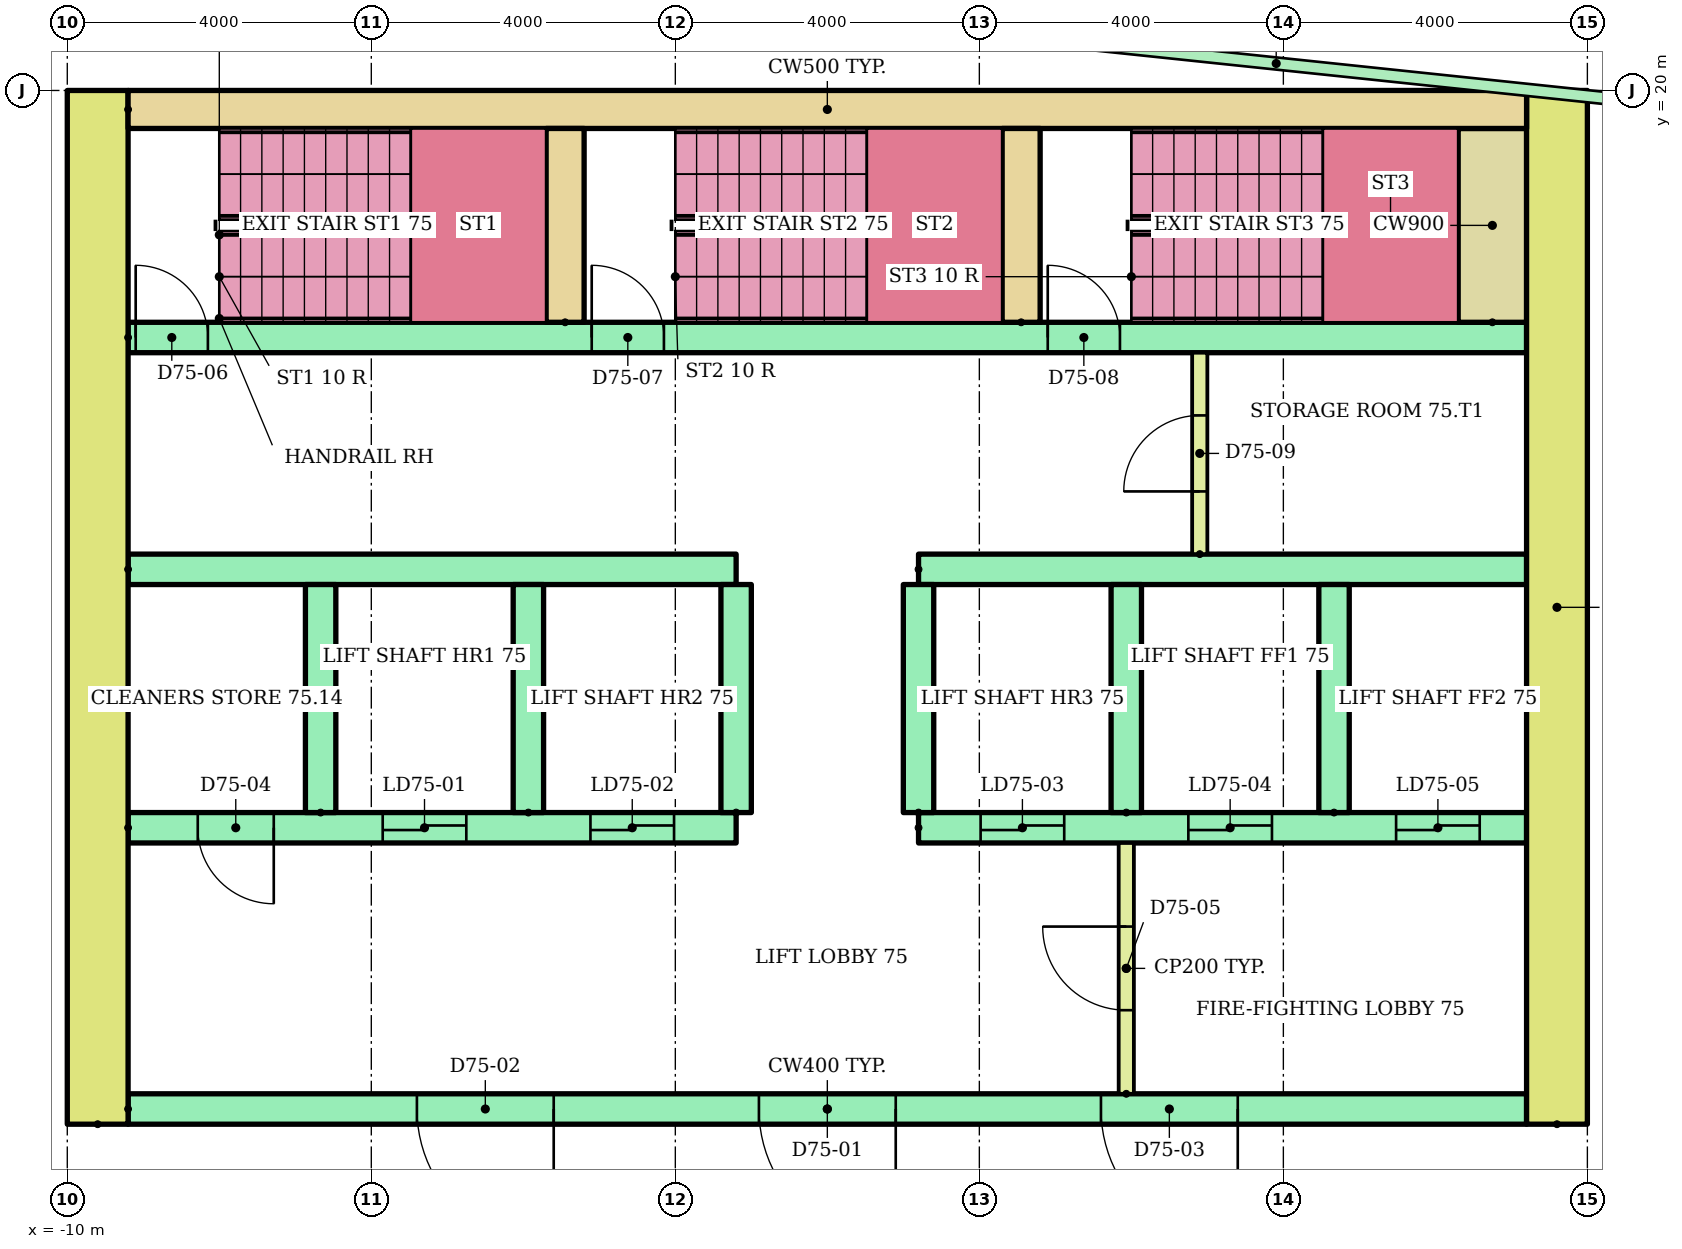
"""IFC4 building model, lengths in metres.
Left out: names, types, materials, properties, quantities, classifications, styles, units other than length and angle.
Written with IfcOpenShell. Run it as: python <this file> out.ifc"""

import sys

from ifc_helpers import new_model, si_unit, direction, frame, frame_2d, origin, place, context, subcontext, project, spatial, rectangle, extrude, element, fill, save


model = new_model("IFC4")
c1 = context("Model", 3, precision=1e-05, world=origin(), true_north=direction((0.0, 1.0)))
c2 = subcontext(c1, "Body", "Model", "MODEL_VIEW")
j1 = project(units=[si_unit("LENGTHUNIT", "METRE"), si_unit("PLANEANGLEUNIT", "RADIAN")], contexts=[c1])
p1 = place(None, origin())
s1 = spatial("IfcSite", under=j1, at=p1, CompositionType="ELEMENT")
p2 = place(p1, origin())
s2 = spatial("IfcBuilding", under=s1, at=p2, CompositionType="ELEMENT")
p3 = place(p2, frame((0.0, 0.0, 291.5)))
s3 = spatial("IfcBuildingStorey", under=s2, at=p3, CompositionType="ELEMENT", Elevation=291.5)
for number, where, z_axis, x_axis in (
    (1, (-9.6, 6.4, 0.0), (0.0, 0.0, 1.0), (0.0, 1.0, 0.0)),
    (2, (9.6, 6.4, 0.0), (0.0, 0.0, 1.0), (0.0, 1.0, 0.0)),
):
    element("IfcWall", number, at=place(p3, frame(where, z_axis=z_axis, x_axis=x_axis)), inside=s3, PredefinedType="SHEAR", context=c2, shape_type="SweptSolid", body=[
        extrude(rectangle(XDim=13.6, YDim=0.8, at=frame_2d((6.8, 0.0))), origin(), (0.0, 0.0, 1.0), 3.12),
    ])
p4 = place(p3, frame((-9.2, 19.75, 0.0)))
e3 = element("IfcWall", 3, at=p4, inside=s3, PredefinedType="SHEAR", context=c2, shape_type="SweptSolid", body=[
    extrude(rectangle(XDim=18.4, YDim=0.5, at=frame_2d((9.2, 0.0))), origin(), (0.0, 0.0, 1.0), 3.12),
])
p5 = place(p3, frame((-9.2, 6.6, 0.0)))
e4 = element("IfcWall", 4, at=p5, inside=s3, PredefinedType="SHEAR", context=c2, shape_type="SweptSolid", body=[
    extrude(rectangle(XDim=18.4, YDim=0.4, at=frame_2d((9.2, 0.0))), origin(), (0.0, 0.0, 1.0), 3.12),
])
p6 = place(p5, frame((8.3, 0.0, 0.0)))
e5 = element("IfcOpeningElement", 5, at=p6, cuts=e4, PredefinedType="OPENING", context=c2, shape_type="SweptSolid", body=[
    extrude(rectangle(XDim=1.8, YDim=2.1, at=frame_2d((0.9, 1.05))), frame((0.0, 0.21, 0.0), z_axis=(0.0, -1.0, 0.0), x_axis=(1.0, 0.0, 0.0)), (0.0, 0.0, 1.0), 0.42),
])
p7 = place(p5, frame((3.8, 0.0, 0.0)))
e6 = element("IfcOpeningElement", 6, at=p7, cuts=e4, PredefinedType="OPENING", context=c2, shape_type="SweptSolid", body=[
    extrude(rectangle(XDim=1.8, YDim=2.1, at=frame_2d((0.9, 1.05))), frame((0.0, 0.21, 0.0), z_axis=(0.0, -1.0, 0.0), x_axis=(1.0, 0.0, 0.0)), (0.0, 0.0, 1.0), 0.42),
])
p8 = place(p5, frame((12.8, 0.0, 0.0)))
e7 = element("IfcOpeningElement", 7, at=p8, cuts=e4, PredefinedType="OPENING", context=c2, shape_type="SweptSolid", body=[
    extrude(rectangle(XDim=1.8, YDim=2.1, at=frame_2d((0.9, 1.05))), frame((0.0, 0.21, 0.0), z_axis=(0.0, -1.0, 0.0), x_axis=(1.0, 0.0, 0.0)), (0.0, 0.0, 1.0), 0.42),
])
p9 = place(p3, frame((-9.2, 10.3, 0.0)))
e8 = element("IfcWall", 8, at=p9, inside=s3, PredefinedType="SHEAR", context=c2, shape_type="SweptSolid", body=[
    extrude(rectangle(XDim=8.0, YDim=0.4, at=frame_2d((4.0, 0.0))), origin(), (0.0, 0.0, 1.0), 3.12),
])
p10 = place(p9, frame((3.35, 0.0, 0.0)))
e9 = element("IfcOpeningElement", 9, at=p10, cuts=e8, PredefinedType="OPENING", context=c2, shape_type="SweptSolid", body=[
    extrude(rectangle(XDim=1.1, YDim=2.1, at=frame_2d((0.55, 1.05))), frame((0.0, 0.21, 0.0), z_axis=(0.0, -1.0, 0.0), x_axis=(1.0, 0.0, 0.0)), (0.0, 0.0, 1.0), 0.42),
])
p11 = place(p9, frame((6.083, 0.0, 0.0)))
e10 = element("IfcOpeningElement", 10, at=p11, cuts=e8, PredefinedType="OPENING", context=c2, shape_type="SweptSolid", body=[
    extrude(rectangle(XDim=1.1, YDim=2.1, at=frame_2d((0.55, 1.05))), frame((0.0, 0.21, 0.0), z_axis=(0.0, -1.0, 0.0), x_axis=(1.0, 0.0, 0.0)), (0.0, 0.0, 1.0), 0.42),
])
p12 = place(p9, frame((0.917, 0.0, 0.0)))
e11 = element("IfcOpeningElement", 11, at=p12, cuts=e8, PredefinedType="OPENING", context=c2, shape_type="SweptSolid", body=[
    extrude(rectangle(XDim=1.0, YDim=2.1, at=frame_2d((0.5, 1.05))), frame((0.0, 0.21, 0.0), z_axis=(0.0, -1.0, 0.0), x_axis=(1.0, 0.0, 0.0)), (0.0, 0.0, 1.0), 0.42),
])
p13 = place(p3, frame((-9.2, 13.7, 0.0)))
e12 = element("IfcWall", 12, at=p13, inside=s3, PredefinedType="SHEAR", context=c2, shape_type="SweptSolid", body=[
    extrude(rectangle(XDim=8.0, YDim=0.4, at=frame_2d((4.0, 0.0))), origin(), (0.0, 0.0, 1.0), 3.12),
])
p14 = place(p3, frame((1.2, 10.3, 0.0)))
e13 = element("IfcWall", 13, at=p14, inside=s3, PredefinedType="SHEAR", context=c2, shape_type="SweptSolid", body=[
    extrude(rectangle(XDim=8.0, YDim=0.4, at=frame_2d((4.0, 0.0))), origin(), (0.0, 0.0, 1.0), 3.12),
])
p15 = place(p14, frame((0.817, 0.0, 0.0)))
e14 = element("IfcOpeningElement", 14, at=p15, cuts=e13, PredefinedType="OPENING", context=c2, shape_type="SweptSolid", body=[
    extrude(rectangle(XDim=1.1, YDim=2.1, at=frame_2d((0.55, 1.05))), frame((0.0, 0.21, 0.0), z_axis=(0.0, -1.0, 0.0), x_axis=(1.0, 0.0, 0.0)), (0.0, 0.0, 1.0), 0.42),
])
p16 = place(p14, frame((3.55, 0.0, 0.0)))
e15 = element("IfcOpeningElement", 15, at=p16, cuts=e13, PredefinedType="OPENING", context=c2, shape_type="SweptSolid", body=[
    extrude(rectangle(XDim=1.1, YDim=2.1, at=frame_2d((0.55, 1.05))), frame((0.0, 0.21, 0.0), z_axis=(0.0, -1.0, 0.0), x_axis=(1.0, 0.0, 0.0)), (0.0, 0.0, 1.0), 0.42),
])
p17 = place(p14, frame((6.283, 0.0, 0.0)))
e16 = element("IfcOpeningElement", 16, at=p17, cuts=e13, PredefinedType="OPENING", context=c2, shape_type="SweptSolid", body=[
    extrude(rectangle(XDim=1.1, YDim=2.1, at=frame_2d((0.55, 1.05))), frame((0.0, 0.21, 0.0), z_axis=(0.0, -1.0, 0.0), x_axis=(1.0, 0.0, 0.0)), (0.0, 0.0, 1.0), 0.42),
])
p18 = place(p3, frame((1.2, 13.7, 0.0)))
e17 = element("IfcWall", 17, at=p18, inside=s3, PredefinedType="SHEAR", context=c2, shape_type="SweptSolid", body=[
    extrude(rectangle(XDim=8.0, YDim=0.4, at=frame_2d((4.0, 0.0))), origin(), (0.0, 0.0, 1.0), 3.12),
])
for number, where, z_axis, x_axis in (
    (18, (-6.667, 10.5, 0.0), (0.0, 0.0, 1.0), (0.0, 1.0, 0.0)),
    (19, (-3.933, 10.5, 0.0), (0.0, 0.0, 1.0), (0.0, 1.0, 0.0)),
    (20, (-1.2, 10.5, 0.0), (0.0, 0.0, 1.0), (0.0, 1.0, 0.0)),
    (21, (1.2, 10.5, 0.0), (0.0, 0.0, 1.0), (0.0, 1.0, 0.0)),
    (22, (3.933, 10.5, 0.0), (0.0, 0.0, 1.0), (0.0, 1.0, 0.0)),
    (23, (6.667, 10.5, 0.0), (0.0, 0.0, 1.0), (0.0, 1.0, 0.0)),
):
    element("IfcWall", number, at=place(p3, frame(where, z_axis=z_axis, x_axis=x_axis)), inside=s3, PredefinedType="SHEAR", context=c2, shape_type="SweptSolid", body=[
        extrude(rectangle(XDim=3.0, YDim=0.4, at=frame_2d((1.5, 0.0))), origin(), (0.0, 0.0, 1.0), 3.12),
    ])
p19 = place(p3, frame((3.933, 6.8, 0.0), z_axis=(0.0, 0.0, 1.0), x_axis=(0.0, 1.0, 0.0)))
e24 = element("IfcWall", 24, at=p19, inside=s3, PredefinedType="PARTITIONING", context=c2, shape_type="SweptSolid", body=[
    extrude(rectangle(XDim=3.3, YDim=0.2, at=frame_2d((1.65, 0.0))), origin(), (0.0, 0.0, 1.0), 3.12),
])
p20 = place(p19, frame((1.1, 0.0, 0.0)))
e25 = element("IfcOpeningElement", 25, at=p20, cuts=e24, PredefinedType="OPENING", context=c2, shape_type="SweptSolid", body=[
    extrude(rectangle(XDim=1.1, YDim=2.1, at=frame_2d((0.55, 1.05))), frame((0.0, 0.11, 0.0), z_axis=(0.0, -1.0, 0.0), x_axis=(1.0, 0.0, 0.0)), (0.0, 0.0, 1.0), 0.22),
])
p21 = place(p3, frame((-9.2, 16.75, 0.0)))
e26 = element("IfcWall", 26, at=p21, inside=s3, PredefinedType="SHEAR", context=c2, shape_type="SweptSolid", body=[
    extrude(rectangle(XDim=18.4, YDim=0.4, at=frame_2d((9.2, 0.0))), origin(), (0.0, 0.0, 1.0), 3.12),
])
p22 = place(p21, frame((0.1, 0.0, 0.0)))
e27 = element("IfcOpeningElement", 27, at=p22, cuts=e26, PredefinedType="OPENING", context=c2, shape_type="SweptSolid", body=[
    extrude(rectangle(XDim=0.95, YDim=2.1, at=frame_2d((0.475, 1.05))), frame((0.0, 0.21, 0.0), z_axis=(0.0, -1.0, 0.0), x_axis=(1.0, 0.0, 0.0)), (0.0, 0.0, 1.0), 0.42),
])
p23 = place(p21, frame((6.1, 0.0, 0.0)))
e28 = element("IfcOpeningElement", 28, at=p23, cuts=e26, PredefinedType="OPENING", context=c2, shape_type="SweptSolid", body=[
    extrude(rectangle(XDim=0.95, YDim=2.1, at=frame_2d((0.475, 1.05))), frame((0.0, 0.21, 0.0), z_axis=(0.0, -1.0, 0.0), x_axis=(1.0, 0.0, 0.0)), (0.0, 0.0, 1.0), 0.42),
])
p24 = place(p21, frame((12.1, 0.0, 0.0)))
e29 = element("IfcOpeningElement", 29, at=p24, cuts=e26, PredefinedType="OPENING", context=c2, shape_type="SweptSolid", body=[
    extrude(rectangle(XDim=0.95, YDim=2.1, at=frame_2d((0.475, 1.05))), frame((0.0, 0.21, 0.0), z_axis=(0.0, -1.0, 0.0), x_axis=(1.0, 0.0, 0.0)), (0.0, 0.0, 1.0), 0.42),
])
for number, where, z_axis, x_axis in (
    (30, (-3.45, 16.95, 0.0), (0.0, 0.0, 1.0), (0.0, 1.0, 0.0)),
    (31, (2.55, 16.95, 0.0), (0.0, 0.0, 1.0), (0.0, 1.0, 0.0)),
):
    element("IfcWall", number, at=place(p3, frame(where, z_axis=z_axis, x_axis=x_axis)), inside=s3, PredefinedType="SHEAR", context=c2, shape_type="SweptSolid", body=[
        extrude(rectangle(XDim=2.55, YDim=0.5, at=frame_2d((1.275, 0.0))), origin(), (0.0, 0.0, 1.0), 3.12),
    ])
p25 = place(p3, frame((8.75, 16.95, 0.0), z_axis=(0.0, 0.0, 1.0), x_axis=(0.0, 1.0, 0.0)))
e32 = element("IfcWall", 32, at=p25, inside=s3, PredefinedType="SHEAR", context=c2, shape_type="SweptSolid", body=[
    extrude(rectangle(XDim=2.55, YDim=0.9, at=frame_2d((1.275, 0.0))), origin(), (0.0, 0.0, 1.0), 3.12),
])
p26 = place(p3, frame((4.9, 13.9, 0.0), z_axis=(0.0, 0.0, 1.0), x_axis=(0.0, 1.0, 0.0)))
e33 = element("IfcWall", 33, at=p26, inside=s3, PredefinedType="PARTITIONING", context=c2, shape_type="SweptSolid", body=[
    extrude(rectangle(XDim=2.65, YDim=0.2, at=frame_2d((1.325, 0.0))), origin(), (0.0, 0.0, 1.0), 3.12),
])
p27 = place(p26, frame((0.825, 0.0, 0.0)))
e34 = element("IfcOpeningElement", 34, at=p27, cuts=e33, PredefinedType="OPENING", context=c2, shape_type="SweptSolid", body=[
    extrude(rectangle(XDim=1.0, YDim=2.1, at=frame_2d((0.5, 1.05))), frame((0.0, 0.11, 0.0), z_axis=(0.0, -1.0, 0.0), x_axis=(1.0, 0.0, 0.0)), (0.0, 0.0, 1.0), 0.22),
])
p28 = place(p6, frame((1.8, 0.0, 0.0), z_axis=(0.0, 0.0, 1.0), x_axis=(-1.0, 0.0, 0.0)))
e35 = element("IfcDoor", 35, at=p28, inside=s3, OperationType="DOUBLE_DOOR_SINGLE_SWING", PredefinedType="DOOR", context=c2, shape_type="SweptSolid", body=[
    extrude(rectangle(XDim=1.8, YDim=2.1, at=frame_2d((0.9, 1.05))), frame((0.0, 0.025, 0.0), z_axis=(0.0, -1.0, 0.0), x_axis=(1.0, 0.0, 0.0)), (0.0, 0.0, 1.0), 0.05),
])
fill(e5, e35)
p29 = place(p7, frame((1.8, 0.0, 0.0), z_axis=(0.0, 0.0, 1.0), x_axis=(-1.0, 0.0, 0.0)))
e36 = element("IfcDoor", 36, at=p29, inside=s3, OperationType="DOUBLE_DOOR_SINGLE_SWING", PredefinedType="DOOR", context=c2, shape_type="SweptSolid", body=[
    extrude(rectangle(XDim=1.8, YDim=2.1, at=frame_2d((0.9, 1.05))), frame((0.0, 0.025, 0.0), z_axis=(0.0, -1.0, 0.0), x_axis=(1.0, 0.0, 0.0)), (0.0, 0.0, 1.0), 0.05),
])
fill(e6, e36)
p30 = place(p8, frame((1.8, 0.0, 0.0), z_axis=(0.0, 0.0, 1.0), x_axis=(-1.0, 0.0, 0.0)))
e37 = element("IfcDoor", 37, at=p30, inside=s3, OperationType="DOUBLE_DOOR_SINGLE_SWING", PredefinedType="DOOR", context=c2, shape_type="SweptSolid", body=[
    extrude(rectangle(XDim=1.8, YDim=2.1, at=frame_2d((0.9, 1.05))), frame((0.0, 0.025, 0.0), z_axis=(0.0, -1.0, 0.0), x_axis=(1.0, 0.0, 0.0)), (0.0, 0.0, 1.0), 0.05),
])
fill(e7, e37)
p31 = place(p10, origin())
e38 = element("IfcDoor", 38, at=p31, inside=s3, OperationType="SLIDING_TO_LEFT", PredefinedType="DOOR", context=c2, shape_type="SweptSolid", body=[
    extrude(rectangle(XDim=1.1, YDim=2.1, at=frame_2d((0.55, 1.05))), frame((0.0, 0.025, 0.0), z_axis=(0.0, -1.0, 0.0), x_axis=(1.0, 0.0, 0.0)), (0.0, 0.0, 1.0), 0.05),
])
fill(e9, e38)
p32 = place(p11, origin())
e39 = element("IfcDoor", 39, at=p32, inside=s3, OperationType="SLIDING_TO_LEFT", PredefinedType="DOOR", context=c2, shape_type="SweptSolid", body=[
    extrude(rectangle(XDim=1.1, YDim=2.1, at=frame_2d((0.55, 1.05))), frame((0.0, 0.025, 0.0), z_axis=(0.0, -1.0, 0.0), x_axis=(1.0, 0.0, 0.0)), (0.0, 0.0, 1.0), 0.05),
])
fill(e10, e39)
p33 = place(p15, origin())
e40 = element("IfcDoor", 40, at=p33, inside=s3, OperationType="SLIDING_TO_LEFT", PredefinedType="DOOR", context=c2, shape_type="SweptSolid", body=[
    extrude(rectangle(XDim=1.1, YDim=2.1, at=frame_2d((0.55, 1.05))), frame((0.0, 0.025, 0.0), z_axis=(0.0, -1.0, 0.0), x_axis=(1.0, 0.0, 0.0)), (0.0, 0.0, 1.0), 0.05),
])
fill(e14, e40)
p34 = place(p16, origin())
e41 = element("IfcDoor", 41, at=p34, inside=s3, OperationType="SLIDING_TO_LEFT", PredefinedType="DOOR", context=c2, shape_type="SweptSolid", body=[
    extrude(rectangle(XDim=1.1, YDim=2.1, at=frame_2d((0.55, 1.05))), frame((0.0, 0.025, 0.0), z_axis=(0.0, -1.0, 0.0), x_axis=(1.0, 0.0, 0.0)), (0.0, 0.0, 1.0), 0.05),
])
fill(e15, e41)
p35 = place(p17, origin())
e42 = element("IfcDoor", 42, at=p35, inside=s3, OperationType="SLIDING_TO_LEFT", PredefinedType="DOOR", context=c2, shape_type="SweptSolid", body=[
    extrude(rectangle(XDim=1.1, YDim=2.1, at=frame_2d((0.55, 1.05))), frame((0.0, 0.025, 0.0), z_axis=(0.0, -1.0, 0.0), x_axis=(1.0, 0.0, 0.0)), (0.0, 0.0, 1.0), 0.05),
])
fill(e16, e42)
p36 = place(p12, frame((1.0, 0.0, 0.0), z_axis=(0.0, 0.0, 1.0), x_axis=(-1.0, 0.0, 0.0)))
e43 = element("IfcDoor", 43, at=p36, inside=s3, OperationType="SINGLE_SWING_RIGHT", PredefinedType="DOOR", context=c2, shape_type="SweptSolid", body=[
    extrude(rectangle(XDim=1.0, YDim=2.1, at=frame_2d((0.5, 1.05))), frame((0.0, 0.025, 0.0), z_axis=(0.0, -1.0, 0.0), x_axis=(1.0, 0.0, 0.0)), (0.0, 0.0, 1.0), 0.05),
])
fill(e11, e43)
p37 = place(p20, origin())
e44 = element("IfcDoor", 44, at=p37, inside=s3, OperationType="SINGLE_SWING_RIGHT", PredefinedType="DOOR", context=c2, shape_type="SweptSolid", body=[
    extrude(rectangle(XDim=1.1, YDim=2.1, at=frame_2d((0.55, 1.05))), frame((0.0, 0.025, 0.0), z_axis=(0.0, -1.0, 0.0), x_axis=(1.0, 0.0, 0.0)), (0.0, 0.0, 1.0), 0.05),
])
fill(e25, e44)
p38 = place(p22, origin())
e45 = element("IfcDoor", 45, at=p38, inside=s3, OperationType="SINGLE_SWING_LEFT", PredefinedType="DOOR", context=c2, shape_type="SweptSolid", body=[
    extrude(rectangle(XDim=0.95, YDim=2.1, at=frame_2d((0.475, 1.05))), frame((0.0, 0.025, 0.0), z_axis=(0.0, -1.0, 0.0), x_axis=(1.0, 0.0, 0.0)), (0.0, 0.0, 1.0), 0.05),
])
fill(e27, e45)
p39 = place(p23, origin())
e46 = element("IfcDoor", 46, at=p39, inside=s3, OperationType="SINGLE_SWING_LEFT", PredefinedType="DOOR", context=c2, shape_type="SweptSolid", body=[
    extrude(rectangle(XDim=0.95, YDim=2.1, at=frame_2d((0.475, 1.05))), frame((0.0, 0.025, 0.0), z_axis=(0.0, -1.0, 0.0), x_axis=(1.0, 0.0, 0.0)), (0.0, 0.0, 1.0), 0.05),
])
fill(e28, e46)
p40 = place(p24, origin())
e47 = element("IfcDoor", 47, at=p40, inside=s3, OperationType="SINGLE_SWING_LEFT", PredefinedType="DOOR", context=c2, shape_type="SweptSolid", body=[
    extrude(rectangle(XDim=0.95, YDim=2.1, at=frame_2d((0.475, 1.05))), frame((0.0, 0.025, 0.0), z_axis=(0.0, -1.0, 0.0), x_axis=(1.0, 0.0, 0.0)), (0.0, 0.0, 1.0), 0.05),
])
fill(e29, e47)
p41 = place(p27, origin())
e48 = element("IfcDoor", 48, at=p41, inside=s3, OperationType="SINGLE_SWING_LEFT", PredefinedType="DOOR", context=c2, shape_type="SweptSolid", body=[
    extrude(rectangle(XDim=1.0, YDim=2.1, at=frame_2d((0.5, 1.05))), frame((0.0, 0.025, 0.0), z_axis=(0.0, -1.0, 0.0), x_axis=(1.0, 0.0, 0.0)), (0.0, 0.0, 1.0), 0.05),
])
fill(e34, e48)
save(model, sys.argv[1])
